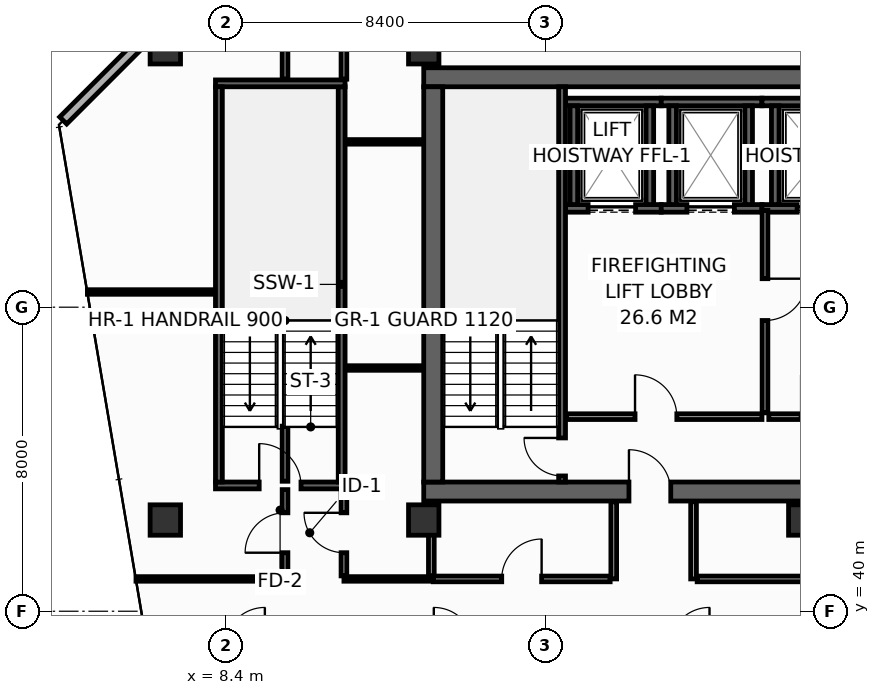
"""IFC4 building model, lengths in metres.
Left out: names, types, materials, properties, quantities, classifications, styles, units other than length and angle.
Written with IfcOpenShell. Run it as: python <this file> out.ifc"""

import sys

from ifc_helpers import new_model, si_unit, direction, frame, frame_2d, origin, origin_2d, place, context, subcontext, project, spatial, rectangle, hollow_rectangle, extrude, element, fill, save


model = new_model("IFC4")
c1 = context("Model", 3, precision=1e-05, world=origin(), true_north=direction((0.0, 1.0)))
c2 = subcontext(c1, "Body", "Model", "MODEL_VIEW")
j1 = project(units=[si_unit("LENGTHUNIT", "METRE"), si_unit("PLANEANGLEUNIT", "RADIAN")], contexts=[c1])
p1 = place(None, origin())
s1 = spatial("IfcSite", under=j1, at=p1, CompositionType="ELEMENT")
p2 = place(p1, origin())
s2 = spatial("IfcBuilding", under=s1, at=p2, CompositionType="ELEMENT")
p3 = place(p2, frame((0.0, 0.0, 201.8)))
s3 = spatial("IfcBuildingStorey", under=s2, at=p3, CompositionType="ELEMENT", Elevation=201.8)
p4 = place(p3, frame((13.6, 43.15, 0.0), z_axis=(0.0, 0.0, 1.0), x_axis=(1.0, 0.0, 0.0)))
e1 = element("IfcWall", 1, at=p4, inside=s3, PredefinedType="SHEAR", context=c2, shape_type="SweptSolid", body=[
    extrude(rectangle(XDim=32.7, YDim=0.5, at=frame_2d((16.35, 0.0))), origin(), (0.0, 0.0, 1.0), 3.55),
])
p5 = place(p4, frame((5.4, 0.0, 0.0)))
e2 = element("IfcOpeningElement", 2, at=p5, cuts=e1, PredefinedType="OPENING", context=c2, shape_type="SweptSolid", body=[
    extrude(rectangle(XDim=1.1, YDim=2.15, at=frame_2d((0.55, 1.075))), frame((0.0, 0.26, 0.0), z_axis=(0.0, -1.0, 0.0), x_axis=(1.0, 0.0, 0.0)), (0.0, 0.0, 1.0), 0.52),
])
p6 = place(p4, frame((25.6, 0.0, 0.0)))
e3 = element("IfcOpeningElement", 3, at=p6, cuts=e1, PredefinedType="OPENING", context=c2, shape_type="SweptSolid", body=[
    extrude(rectangle(XDim=1.1, YDim=2.15, at=frame_2d((0.55, 1.075))), frame((0.0, 0.26, 0.0), z_axis=(0.0, -1.0, 0.0), x_axis=(1.0, 0.0, 0.0)), (0.0, 0.0, 1.0), 0.52),
])
p7 = place(p3, frame((13.6, 54.05, 0.0), z_axis=(0.0, 0.0, 1.0), x_axis=(1.0, 0.0, 0.0)))
e4 = element("IfcWall", 4, at=p7, inside=s3, PredefinedType="SHEAR", context=c2, shape_type="SweptSolid", body=[
    extrude(rectangle(XDim=32.7, YDim=0.5, at=frame_2d((16.35, 0.0))), origin(), (0.0, 0.0, 1.0), 3.55),
])
p8 = place(p3, frame((13.85, 43.4, 0.0), z_axis=(0.0, 0.0, 1.0), x_axis=(0.0, 1.0, 0.0)))
e5 = element("IfcWall", 5, at=p8, inside=s3, PredefinedType="SHEAR", context=c2, shape_type="SweptSolid", body=[
    extrude(rectangle(XDim=10.4, YDim=0.5, at=frame_2d((5.2, 0.0))), origin(), (0.0, 0.0, 1.0), 3.55),
])
for number, where, z_axis, x_axis in (
    (6, (6.8, 54.8, 0.0), (0.0, 0.0, 1.0), (1.0, 0.0, 0.0)),
    (7, (13.6, 54.8, 0.0), (0.0, 0.0, 1.0), (1.0, 0.0, 0.0)),
    (8, (6.8, 42.4, 0.0), (0.0, 0.0, 1.0), (1.0, 0.0, 0.0)),
    (9, (13.6, 42.4, 0.0), (0.0, 0.0, 1.0), (1.0, 0.0, 0.0)),
    (10, (23.6, 42.4, 0.0), (0.0, 0.0, 1.0), (1.0, 0.0, 0.0)),
):
    element("IfcColumn", number, at=place(p3, frame(where, z_axis=z_axis, x_axis=x_axis)), inside=s3, PredefinedType="COLUMN", context=c2, shape_type="SweptSolid", body=[
        extrude(hollow_rectangle(XDim=0.8, YDim=0.8, WallThickness=0.036, at=origin_2d()), origin(), (0.0, 0.0, 1.0), 3.8),
    ])
p9 = place(p3, frame((17.33, 50.6, 0.0), z_axis=(0.0, 0.0, 1.0), x_axis=(1.0, 0.0, 0.0)))
e11 = element("IfcWall", 11, at=p9, inside=s3, PredefinedType="SHEAR", context=c2, shape_type="SweptSolid", body=[
    extrude(rectangle(XDim=2.52, YDim=0.2, at=frame_2d((1.26, 0.0))), origin(), (0.0, 0.0, 1.0), 3.55),
])
p10 = place(p9, frame((0.595, 0.0, 0.0)))
e12 = element("IfcOpeningElement", 12, at=p10, cuts=e11, PredefinedType="OPENING", context=c2, shape_type="SweptSolid", body=[
    extrude(rectangle(XDim=1.25, YDim=2.3, at=frame_2d((0.625, 1.15))), frame((0.0, 0.11, 0.0), z_axis=(0.0, -1.0, 0.0), x_axis=(1.0, 0.0, 0.0)), (0.0, 0.0, 1.0), 0.22),
])
p11 = place(p3, frame((17.33, 53.4, 0.0), z_axis=(0.0, 0.0, 1.0), x_axis=(1.0, 0.0, 0.0)))
e13 = element("IfcWall", 13, at=p11, inside=s3, PredefinedType="SHEAR", context=c2, shape_type="SweptSolid", body=[
    extrude(rectangle(XDim=2.52, YDim=0.2, at=frame_2d((1.26, 0.0))), origin(), (0.0, 0.0, 1.0), 3.55),
])
for number, where, z_axis, x_axis in (
    (14, (17.55, 50.7, 0.0), (0.0, 0.0, 1.0), (0.0, 1.0, 0.0)),
    (15, (19.55, 50.7, 0.0), (0.0, 0.0, 1.0), (0.0, 1.0, 0.0)),
):
    element("IfcWall", number, at=place(p3, frame(where, z_axis=z_axis, x_axis=x_axis)), inside=s3, PredefinedType="SHEAR", context=c2, shape_type="SweptSolid", body=[
        extrude(rectangle(XDim=2.6, YDim=0.2, at=frame_2d((1.3, 0.0))), origin(), (0.0, 0.0, 1.0), 3.55),
    ])
p12 = place(p3, frame((19.85, 50.6, 0.0), z_axis=(0.0, 0.0, 1.0), x_axis=(1.0, 0.0, 0.0)))
e16 = element("IfcWall", 16, at=p12, inside=s3, PredefinedType="SHEAR", context=c2, shape_type="SweptSolid", body=[
    extrude(rectangle(XDim=2.65, YDim=0.2, at=frame_2d((1.325, 0.0))), origin(), (0.0, 0.0, 1.0), 3.55),
])
p13 = place(p12, frame((0.675, 0.0, 0.0)))
e17 = element("IfcOpeningElement", 17, at=p13, cuts=e16, PredefinedType="OPENING", context=c2, shape_type="SweptSolid", body=[
    extrude(rectangle(XDim=1.25, YDim=2.3, at=frame_2d((0.625, 1.15))), frame((0.0, 0.11, 0.0), z_axis=(0.0, -1.0, 0.0), x_axis=(1.0, 0.0, 0.0)), (0.0, 0.0, 1.0), 0.22),
])
p14 = place(p3, frame((19.85, 53.4, 0.0), z_axis=(0.0, 0.0, 1.0), x_axis=(1.0, 0.0, 0.0)))
e18 = element("IfcWall", 18, at=p14, inside=s3, PredefinedType="SHEAR", context=c2, shape_type="SweptSolid", body=[
    extrude(rectangle(XDim=2.65, YDim=0.2, at=frame_2d((1.325, 0.0))), origin(), (0.0, 0.0, 1.0), 3.55),
])
for number, where, z_axis, x_axis in (
    (19, (20.15, 50.7, 0.0), (0.0, 0.0, 1.0), (0.0, 1.0, 0.0)),
    (20, (22.15, 50.7, 0.0), (0.0, 0.0, 1.0), (0.0, 1.0, 0.0)),
):
    element("IfcWall", number, at=place(p3, frame(where, z_axis=z_axis, x_axis=x_axis)), inside=s3, PredefinedType="SHEAR", context=c2, shape_type="SweptSolid", body=[
        extrude(rectangle(XDim=2.6, YDim=0.2, at=frame_2d((1.3, 0.0))), origin(), (0.0, 0.0, 1.0), 3.55),
    ])
p15 = place(p3, frame((22.5, 50.6, 0.0), z_axis=(0.0, 0.0, 1.0), x_axis=(1.0, 0.0, 0.0)))
e21 = element("IfcWall", 21, at=p15, inside=s3, PredefinedType="SHEAR", context=c2, shape_type="SweptSolid", body=[
    extrude(rectangle(XDim=2.85, YDim=0.2, at=frame_2d((1.425, 0.0))), origin(), (0.0, 0.0, 1.0), 3.55),
])
p16 = place(p15, frame((0.925, 0.0, 0.0)))
e22 = element("IfcOpeningElement", 22, at=p16, cuts=e21, PredefinedType="OPENING", context=c2, shape_type="SweptSolid", body=[
    extrude(rectangle(XDim=1.25, YDim=2.3, at=frame_2d((0.625, 1.15))), frame((0.0, 0.11, 0.0), z_axis=(0.0, -1.0, 0.0), x_axis=(1.0, 0.0, 0.0)), (0.0, 0.0, 1.0), 0.22),
])
p17 = place(p3, frame((22.5, 53.4, 0.0), z_axis=(0.0, 0.0, 1.0), x_axis=(1.0, 0.0, 0.0)))
e23 = element("IfcWall", 23, at=p17, inside=s3, PredefinedType="SHEAR", context=c2, shape_type="SweptSolid", body=[
    extrude(rectangle(XDim=2.85, YDim=0.2, at=frame_2d((1.425, 0.0))), origin(), (0.0, 0.0, 1.0), 3.55),
])
p18 = place(p3, frame((22.85, 50.7, 0.0), z_axis=(0.0, 0.0, 1.0), x_axis=(0.0, 1.0, 0.0)))
e24 = element("IfcWall", 24, at=p18, inside=s3, PredefinedType="SHEAR", context=c2, shape_type="SweptSolid", body=[
    extrude(rectangle(XDim=2.6, YDim=0.2, at=frame_2d((1.3, 0.0))), origin(), (0.0, 0.0, 1.0), 3.55),
])
p19 = place(p3, frame((17.24, 43.4, 0.0), z_axis=(0.0, 0.0, 1.0), x_axis=(0.0, 1.0, 0.0)))
e25 = element("IfcWall", 25, at=p19, inside=s3, PredefinedType="SHEAR", context=c2, shape_type="SweptSolid", body=[
    extrude(rectangle(XDim=10.4, YDim=0.18, at=frame_2d((5.2, 0.0))), origin(), (0.0, 0.0, 1.0), 3.55),
])
p20 = place(p19, frame((0.16, 0.0, 0.0)))
e26 = element("IfcOpeningElement", 26, at=p20, cuts=e25, PredefinedType="OPENING", context=c2, shape_type="SweptSolid", body=[
    extrude(rectangle(XDim=1.0, YDim=2.15, at=frame_2d((0.5, 1.075))), frame((0.0, 0.1, 0.0), z_axis=(0.0, -1.0, 0.0), x_axis=(1.0, 0.0, 0.0)), (0.0, 0.0, 1.0), 0.2),
])
p21 = place(p3, frame((8.12, 43.31, 0.0), z_axis=(0.0, 0.0, 1.0), x_axis=(1.0, 0.0, 0.0)))
e27 = element("IfcWall", 27, at=p21, inside=s3, PredefinedType="SHEAR", context=c2, shape_type="SweptSolid", body=[
    extrude(rectangle(XDim=3.41, YDim=0.18, at=frame_2d((1.705, 0.0))), origin(), (0.0, 0.0, 1.0), 3.55),
])
p22 = place(p21, frame((1.15, 0.0, 0.0)))
e28 = element("IfcOpeningElement", 28, at=p22, cuts=e27, PredefinedType="OPENING", context=c2, shape_type="SweptSolid", body=[
    extrude(rectangle(XDim=1.1, YDim=2.15, at=frame_2d((0.55, 1.075))), frame((0.0, 0.1, 0.0), z_axis=(0.0, -1.0, 0.0), x_axis=(1.0, 0.0, 0.0)), (0.0, 0.0, 1.0), 0.2),
])
p23 = place(p3, frame((11.44, 43.4, 0.0), z_axis=(0.0, 0.0, 1.0), x_axis=(0.0, 1.0, 0.0)))
e29 = element("IfcWall", 29, at=p23, inside=s3, PredefinedType="SHEAR", context=c2, shape_type="SweptSolid", body=[
    extrude(rectangle(XDim=10.4, YDim=0.18, at=frame_2d((5.2, 0.0))), origin(), (0.0, 0.0, 1.0), 3.55),
])
p24 = place(p3, frame((11.53, 53.89, 0.0), z_axis=(0.0, 0.0, 1.0), x_axis=(-1.0, 0.0, 0.0)))
e30 = element("IfcWall", 30, at=p24, inside=s3, PredefinedType="SHEAR", context=c2, shape_type="SweptSolid", body=[
    extrude(rectangle(XDim=3.41, YDim=0.18, at=frame_2d((1.705, 0.0))), origin(), (0.0, 0.0, 1.0), 3.55),
])
p25 = place(p3, frame((8.21, 53.8, 0.0), z_axis=(0.0, 0.0, 1.0), x_axis=(0.0, -1.0, 0.0)))
e31 = element("IfcWall", 31, at=p25, inside=s3, PredefinedType="SHEAR", context=c2, shape_type="SweptSolid", body=[
    extrude(rectangle(XDim=10.4, YDim=0.18, at=frame_2d((5.2, 0.0))), origin(), (0.0, 0.0, 1.0), 3.55),
])
p26 = place(p3, frame((17.36, 45.12, 0.0), z_axis=(0.0, 0.0, 1.0), x_axis=(1.0, 0.0, 0.0)))
e32 = element("IfcWall", 32, at=p26, inside=s3, PredefinedType="PARTITIONING", context=c2, shape_type="SweptSolid", body=[
    extrude(rectangle(XDim=5.14, YDim=0.15, at=frame_2d((2.57, 0.0))), origin(), (0.0, 0.0, 1.0), 3.55),
])
p27 = place(p26, frame((1.8, 0.0, 0.0)))
e33 = element("IfcOpeningElement", 33, at=p27, cuts=e32, PredefinedType="OPENING", context=c2, shape_type="SweptSolid", body=[
    extrude(rectangle(XDim=1.1, YDim=2.15, at=frame_2d((0.55, 1.075))), frame((0.0, 0.085, 0.0), z_axis=(0.0, -1.0, 0.0), x_axis=(1.0, 0.0, 0.0)), (0.0, 0.0, 1.0), 0.17),
])
p28 = place(p3, frame((22.58, 50.55, 0.0), z_axis=(0.0, 0.0, 1.0), x_axis=(0.0, -1.0, 0.0)))
e34 = element("IfcWall", 34, at=p28, inside=s3, PredefinedType="PARTITIONING", context=c2, shape_type="SweptSolid", body=[
    extrude(rectangle(XDim=5.33, YDim=0.15, at=frame_2d((2.665, 0.0))), origin(), (0.0, 0.0, 1.0), 3.55),
])
p29 = place(p28, frame((1.8, 0.0, 0.0)))
e35 = element("IfcOpeningElement", 35, at=p29, cuts=e34, PredefinedType="OPENING", context=c2, shape_type="SweptSolid", body=[
    extrude(rectangle(XDim=1.1, YDim=2.15, at=frame_2d((0.55, 1.075))), frame((0.0, 0.085, 0.0), z_axis=(0.0, -1.0, 0.0), x_axis=(1.0, 0.0, 0.0)), (0.0, 0.0, 1.0), 0.17),
])
p30 = place(p3, frame((22.68, 45.12, 0.0), z_axis=(0.0, 0.0, 1.0), x_axis=(1.0, 0.0, 0.0)))
e36 = element("IfcWall", 36, at=p30, inside=s3, PredefinedType="PARTITIONING", context=c2, shape_type="SweptSolid", body=[
    extrude(rectangle(XDim=2.92, YDim=0.15, at=frame_2d((1.46, 0.0))), origin(), (0.0, 0.0, 1.0), 3.55),
])
p31 = place(p30, frame((0.85, 0.0, 0.0)))
e37 = element("IfcOpeningElement", 37, at=p31, cuts=e36, PredefinedType="OPENING", context=c2, shape_type="SweptSolid", body=[
    extrude(rectangle(XDim=1.1, YDim=2.15, at=frame_2d((0.55, 1.075))), frame((0.0, 0.085, 0.0), z_axis=(0.0, -1.0, 0.0), x_axis=(1.0, 0.0, 0.0)), (0.0, 0.0, 1.0), 0.17),
])
p32 = place(p3, frame((7.087, 55.887, 0.0), z_axis=(0.0, 0.0, 1.0), x_axis=(-0.707106781187, -0.707106781187, 0.0)))
e38 = element("IfcWall", 38, at=p32, inside=s3, PredefinedType="STANDARD", context=c2, shape_type="SweptSolid", body=[
    extrude(rectangle(XDim=4.206, YDim=0.26, at=frame_2d((2.103, 0.0))), origin(), (0.0, 0.0, 1.0), 3.55),
])
p33 = place(p3, frame((6.028, 40.85, 0.0), z_axis=(0.0, 0.0, 1.0), x_axis=(1.0, 0.0, 0.0)))
e39 = element("IfcWall", 39, at=p33, inside=s3, PredefinedType="PARTITIONING", context=c2, shape_type="SweptSolid", body=[
    extrude(rectangle(XDim=3.922, YDim=0.12, at=frame_2d((1.961, 0.0))), origin(), (0.0, 0.0, 1.0), 3.035),
])
p34 = place(p3, frame((11.5, 40.85, 0.0), z_axis=(0.0, 0.0, 1.0), x_axis=(1.0, 0.0, 0.0)))
e40 = element("IfcWall", 40, at=p34, inside=s3, PredefinedType="PARTITIONING", context=c2, shape_type="SweptSolid", body=[
    extrude(rectangle(XDim=2.35, YDim=0.12, at=frame_2d((1.175, 0.0))), origin(), (0.0, 0.0, 1.0), 3.55),
])
p35 = place(p3, frame((11.55, 52.35, 0.0), z_axis=(0.0, 0.0, 1.0), x_axis=(1.0, 0.0, 0.0)))
e41 = element("IfcWall", 41, at=p35, inside=s3, PredefinedType="PARTITIONING", context=c2, shape_type="SweptSolid", body=[
    extrude(rectangle(XDim=2.03, YDim=0.12, at=frame_2d((1.015, 0.0))), origin(), (0.0, 0.0, 1.0), 3.55),
])
p36 = place(p3, frame((11.5, 54.0, 0.0), z_axis=(0.0, 0.0, 1.0), x_axis=(0.0, 1.0, 0.0)))
e42 = element("IfcWall", 42, at=p36, inside=s3, PredefinedType="PARTITIONING", context=c2, shape_type="SweptSolid", body=[
    extrude(rectangle(XDim=1.995, YDim=0.15, at=frame_2d((0.998, 0.0))), origin(), (0.0, 0.0, 1.0), 2.935),
])
p37 = place(p3, frame((4.75, 48.4, 0.0), z_axis=(0.0, 0.0, 1.0), x_axis=(1.0, 0.0, 0.0)))
e43 = element("IfcWall", 43, at=p37, inside=s3, PredefinedType="PARTITIONING", context=c2, shape_type="SweptSolid", body=[
    extrude(rectangle(XDim=3.35, YDim=0.12, at=frame_2d((1.675, 0.0))), origin(), (0.0, 0.0, 1.0), 2.835),
])
p38 = place(p3, frame((9.95, 40.93, 0.0), z_axis=(0.0, 0.0, 1.0), x_axis=(0.0, 1.0, 0.0)))
e44 = element("IfcWall", 44, at=p38, inside=s3, PredefinedType="PARTITIONING", context=c2, shape_type="SweptSolid", body=[
    extrude(rectangle(XDim=2.27, YDim=0.15, at=frame_2d((1.135, 0.0))), origin(), (0.0, 0.0, 1.0), 2.835),
])
p39 = place(p38, frame((0.61, 0.0, 0.0)))
e45 = element("IfcOpeningElement", 45, at=p39, cuts=e44, PredefinedType="OPENING", context=c2, shape_type="SweptSolid", body=[
    extrude(rectangle(XDim=1.05, YDim=2.15, at=frame_2d((0.525, 1.075))), frame((0.0, 0.085, 0.0), z_axis=(0.0, -1.0, 0.0), x_axis=(1.0, 0.0, 0.0)), (0.0, 0.0, 1.0), 0.17),
])
p40 = place(p3, frame((9.95, 43.42, 0.0), z_axis=(0.0, 0.0, 1.0), x_axis=(0.0, 1.0, 0.0)))
e46 = element("IfcWall", 46, at=p40, inside=s3, PredefinedType="PARTITIONING", context=c2, shape_type="SweptSolid", body=[
    extrude(rectangle(XDim=1.45, YDim=0.15, at=frame_2d((0.725, 0.0))), origin(), (0.0, 0.0, 1.0), 3.55),
])
p41 = place(p3, frame((9.95, 54.0, 0.0), z_axis=(0.0, 0.0, 1.0), x_axis=(0.0, 1.0, 0.0)))
e47 = element("IfcWall", 47, at=p41, inside=s3, PredefinedType="PARTITIONING", context=c2, shape_type="SweptSolid", body=[
    extrude(rectangle(XDim=1.995, YDim=0.15, at=frame_2d((0.998, 0.0))), origin(), (0.0, 0.0, 1.0), 2.935),
])
p42 = place(p3, frame((11.55, 46.4, 0.0), z_axis=(0.0, 0.0, 1.0), x_axis=(1.0, 0.0, 0.0)))
e48 = element("IfcWall", 48, at=p42, inside=s3, PredefinedType="PARTITIONING", context=c2, shape_type="SweptSolid", body=[
    extrude(rectangle(XDim=2.03, YDim=0.12, at=frame_2d((1.015, 0.0))), origin(), (0.0, 0.0, 1.0), 3.55),
])
p43 = place(p3, frame((11.5, 40.93, 0.0), z_axis=(0.0, 0.0, 1.0), x_axis=(0.0, 1.0, 0.0)))
e49 = element("IfcWall", 49, at=p43, inside=s3, PredefinedType="PARTITIONING", context=c2, shape_type="SweptSolid", body=[
    extrude(rectangle(XDim=2.27, YDim=0.15, at=frame_2d((1.135, 0.0))), origin(), (0.0, 0.0, 1.0), 2.835),
])
p44 = place(p43, frame((0.61, 0.0, 0.0)))
e50 = element("IfcOpeningElement", 50, at=p44, cuts=e49, PredefinedType="OPENING", context=c2, shape_type="SweptSolid", body=[
    extrude(rectangle(XDim=1.05, YDim=2.15, at=frame_2d((0.525, 1.075))), frame((0.0, 0.085, 0.0), z_axis=(0.0, -1.0, 0.0), x_axis=(1.0, 0.0, 0.0)), (0.0, 0.0, 1.0), 0.17),
])
p45 = place(p3, frame((13.8, 40.93, 0.0), z_axis=(0.0, 0.0, 1.0), x_axis=(0.0, 1.0, 0.0)))
e51 = element("IfcWall", 51, at=p45, inside=s3, PredefinedType="PARTITIONING", context=c2, shape_type="SweptSolid", body=[
    extrude(rectangle(XDim=1.95, YDim=0.15, at=frame_2d((0.975, 0.0))), origin(), (0.0, 0.0, 1.0), 3.55),
])
for number, where, z_axis, x_axis in (
    (52, (18.6, 40.85, 0.0), (0.0, 0.0, 1.0), (0.0, 1.0, 0.0)),
    (53, (20.7, 40.85, 0.0), (0.0, 0.0, 1.0), (0.0, 1.0, 0.0)),
):
    element("IfcWall", number, at=place(p3, frame(where, z_axis=z_axis, x_axis=x_axis)), inside=s3, PredefinedType="PARTITIONING", context=c2, shape_type="SweptSolid", body=[
        extrude(rectangle(XDim=2.03, YDim=0.15, at=frame_2d((1.015, 0.0))), origin(), (0.0, 0.0, 1.0), 3.55),
    ])
p46 = place(p3, frame((13.85, 40.85, 0.0), z_axis=(0.0, 0.0, 1.0), x_axis=(1.0, 0.0, 0.0)))
e54 = element("IfcWall", 54, at=p46, inside=s3, PredefinedType="PARTITIONING", context=c2, shape_type="SweptSolid", body=[
    extrude(rectangle(XDim=4.655, YDim=0.15, at=frame_2d((2.327, 0.0))), origin(), (0.0, 0.0, 1.0), 3.55),
])
p47 = place(p46, frame((1.802, 0.0, 0.0)))
e55 = element("IfcOpeningElement", 55, at=p47, cuts=e54, PredefinedType="OPENING", context=c2, shape_type="SweptSolid", body=[
    extrude(rectangle(XDim=1.05, YDim=2.15, at=frame_2d((0.525, 1.075))), frame((0.0, 0.085, 0.0), z_axis=(0.0, -1.0, 0.0), x_axis=(1.0, 0.0, 0.0)), (0.0, 0.0, 1.0), 0.17),
])
p48 = place(p3, frame((20.795, 40.85, 0.0), z_axis=(0.0, 0.0, 1.0), x_axis=(1.0, 0.0, 0.0)))
e56 = element("IfcWall", 56, at=p48, inside=s3, PredefinedType="PARTITIONING", context=c2, shape_type="SweptSolid", body=[
    extrude(rectangle(XDim=12.125, YDim=0.15, at=frame_2d((6.062, 0.0))), origin(), (0.0, 0.0, 1.0), 2.835),
])
p49 = place(p48, frame((5.537, 0.0, 0.0)))
e57 = element("IfcOpeningElement", 57, at=p49, cuts=e56, PredefinedType="OPENING", context=c2, shape_type="SweptSolid", body=[
    extrude(rectangle(XDim=1.05, YDim=2.15, at=frame_2d((0.525, 1.075))), frame((0.0, 0.085, 0.0), z_axis=(0.0, -1.0, 0.0), x_axis=(1.0, 0.0, 0.0)), (0.0, 0.0, 1.0), 0.17),
])
p50 = place(p10, origin())
e58 = element("IfcDoor", 58, at=p50, inside=s3, OperationType="SLIDING_TO_LEFT", PredefinedType="DOOR", context=c2, shape_type="SweptSolid", body=[
    extrude(rectangle(XDim=1.25, YDim=2.3, at=frame_2d((0.625, 1.15))), frame((0.0, 0.025, 0.0), z_axis=(0.0, -1.0, 0.0), x_axis=(1.0, 0.0, 0.0)), (0.0, 0.0, 1.0), 0.05),
])
fill(e12, e58)
p51 = place(p13, origin())
e59 = element("IfcDoor", 59, at=p51, inside=s3, OperationType="SLIDING_TO_LEFT", PredefinedType="DOOR", context=c2, shape_type="SweptSolid", body=[
    extrude(rectangle(XDim=1.25, YDim=2.3, at=frame_2d((0.625, 1.15))), frame((0.0, 0.025, 0.0), z_axis=(0.0, -1.0, 0.0), x_axis=(1.0, 0.0, 0.0)), (0.0, 0.0, 1.0), 0.05),
])
fill(e17, e59)
p52 = place(p16, origin())
e60 = element("IfcDoor", 60, at=p52, inside=s3, OperationType="SLIDING_TO_LEFT", PredefinedType="DOOR", context=c2, shape_type="SweptSolid", body=[
    extrude(rectangle(XDim=1.25, YDim=2.3, at=frame_2d((0.625, 1.15))), frame((0.0, 0.025, 0.0), z_axis=(0.0, -1.0, 0.0), x_axis=(1.0, 0.0, 0.0)), (0.0, 0.0, 1.0), 0.05),
])
fill(e22, e60)
p53 = place(p20, origin())
e61 = element("IfcDoor", 61, at=p53, inside=s3, OperationType="SINGLE_SWING_RIGHT", PredefinedType="DOOR", context=c2, shape_type="SweptSolid", body=[
    extrude(rectangle(XDim=1.0, YDim=2.15, at=frame_2d((0.5, 1.075))), frame((0.0, 0.025, 0.0), z_axis=(0.0, -1.0, 0.0), x_axis=(1.0, 0.0, 0.0)), (0.0, 0.0, 1.0), 0.05),
])
fill(e26, e61)
p54 = place(p22, origin())
e62 = element("IfcDoor", 62, at=p54, inside=s3, OperationType="SINGLE_SWING_LEFT", PredefinedType="DOOR", context=c2, shape_type="SweptSolid", body=[
    extrude(rectangle(XDim=1.1, YDim=2.15, at=frame_2d((0.55, 1.075))), frame((0.0, 0.025, 0.0), z_axis=(0.0, -1.0, 0.0), x_axis=(1.0, 0.0, 0.0)), (0.0, 0.0, 1.0), 0.05),
])
fill(e28, e62)
p55 = place(p27, origin())
e63 = element("IfcDoor", 63, at=p55, inside=s3, OperationType="SINGLE_SWING_LEFT", PredefinedType="DOOR", context=c2, shape_type="SweptSolid", body=[
    extrude(rectangle(XDim=1.1, YDim=2.15, at=frame_2d((0.55, 1.075))), frame((0.0, 0.025, 0.0), z_axis=(0.0, -1.0, 0.0), x_axis=(1.0, 0.0, 0.0)), (0.0, 0.0, 1.0), 0.05),
])
fill(e33, e63)
p56 = place(p29, origin())
e64 = element("IfcDoor", 64, at=p56, inside=s3, OperationType="SINGLE_SWING_LEFT", PredefinedType="DOOR", context=c2, shape_type="SweptSolid", body=[
    extrude(rectangle(XDim=1.1, YDim=2.15, at=frame_2d((0.55, 1.075))), frame((0.0, 0.025, 0.0), z_axis=(0.0, -1.0, 0.0), x_axis=(1.0, 0.0, 0.0)), (0.0, 0.0, 1.0), 0.05),
])
fill(e35, e64)
p57 = place(p5, origin())
e65 = element("IfcDoor", 65, at=p57, inside=s3, OperationType="SINGLE_SWING_LEFT", PredefinedType="DOOR", context=c2, shape_type="SweptSolid", body=[
    extrude(rectangle(XDim=1.1, YDim=2.15, at=frame_2d((0.55, 1.075))), frame((0.0, 0.025, 0.0), z_axis=(0.0, -1.0, 0.0), x_axis=(1.0, 0.0, 0.0)), (0.0, 0.0, 1.0), 0.05),
])
fill(e2, e65)
p58 = place(p39, origin())
e66 = element("IfcDoor", 66, at=p58, inside=s3, OperationType="SINGLE_SWING_LEFT", PredefinedType="DOOR", context=c2, shape_type="SweptSolid", body=[
    extrude(rectangle(XDim=1.05, YDim=2.15, at=frame_2d((0.525, 1.075))), frame((0.0, 0.025, 0.0), z_axis=(0.0, -1.0, 0.0), x_axis=(1.0, 0.0, 0.0)), (0.0, 0.0, 1.0), 0.05),
])
fill(e45, e66)
p59 = place(p44, origin())
e67 = element("IfcDoor", 67, at=p59, inside=s3, OperationType="SINGLE_SWING_RIGHT", PredefinedType="DOOR", context=c2, shape_type="SweptSolid", body=[
    extrude(rectangle(XDim=1.05, YDim=2.15, at=frame_2d((0.525, 1.075))), frame((0.0, 0.025, 0.0), z_axis=(0.0, -1.0, 0.0), x_axis=(1.0, 0.0, 0.0)), (0.0, 0.0, 1.0), 0.05),
])
fill(e50, e67)
p60 = place(p47, origin())
e68 = element("IfcDoor", 68, at=p60, inside=s3, OperationType="SINGLE_SWING_RIGHT", PredefinedType="DOOR", context=c2, shape_type="SweptSolid", body=[
    extrude(rectangle(XDim=1.05, YDim=2.15, at=frame_2d((0.525, 1.075))), frame((0.0, 0.025, 0.0), z_axis=(0.0, -1.0, 0.0), x_axis=(1.0, 0.0, 0.0)), (0.0, 0.0, 1.0), 0.05),
])
fill(e55, e68)
save(model, sys.argv[1])
